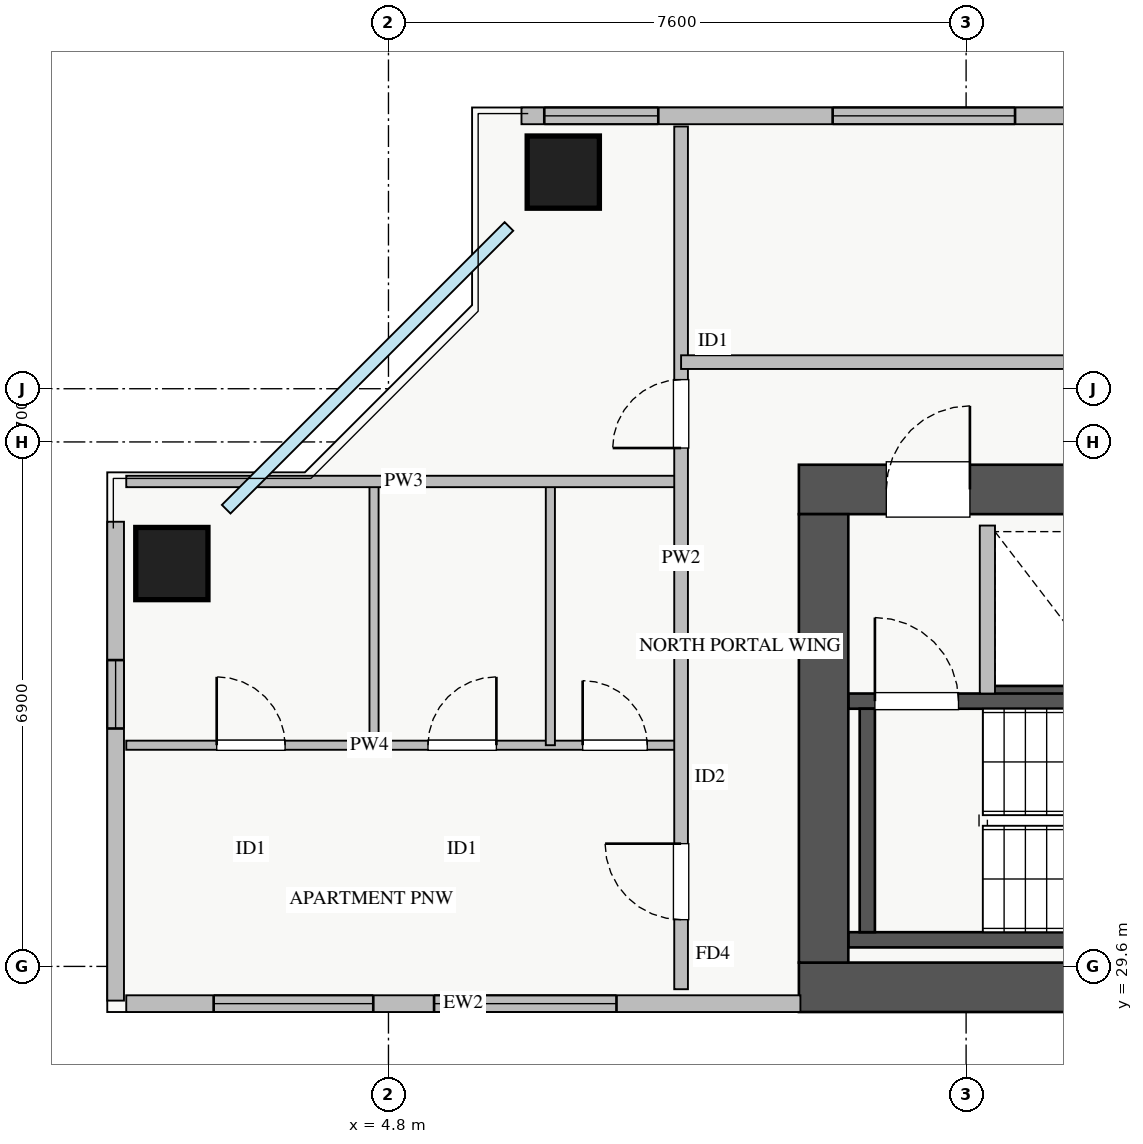
"""IFC4 building model, lengths in metres.
Left out: names, types, materials, properties, quantities, classifications, styles, units other than length and angle.
Written with IfcOpenShell. Run it as: python <this file> out.ifc"""

import sys

from ifc_helpers import new_model, si_unit, direction, frame, frame_2d, origin, origin_2d, place, context, subcontext, project, spatial, rectangle, extrude, source, transform, mapped, element, fill, save


model = new_model("IFC4")
c1 = context("Model", 3, precision=1e-05, world=origin(), true_north=direction((0.0, 1.0)))
c2 = subcontext(c1, "Body", "Model", "MODEL_VIEW")
j1 = project(units=[si_unit("LENGTHUNIT", "METRE"), si_unit("PLANEANGLEUNIT", "RADIAN")], contexts=[c1])
p1 = place(None, origin())
s1 = spatial("IfcSite", under=j1, at=p1, CompositionType="ELEMENT")
p2 = place(p1, origin())
s2 = spatial("IfcBuilding", under=s1, at=p2, CompositionType="ELEMENT")
p3 = place(p2, frame((0.0, 0.0, 156.75)))
s3 = spatial("IfcBuildingStorey", under=s2, at=p3, CompositionType="ELEMENT", Elevation=156.75)
p4 = place(p3, frame((12.68, 33.2, 0.0), z_axis=(0.0, 0.0, 1.0), x_axis=(1.0, 0.0, 0.0)))
e1 = element("IfcWall", 1, at=p4, inside=s3, PredefinedType="SHEAR", context=c2, shape_type="SweptSolid", body=[
    extrude(rectangle(XDim=1.94, YDim=0.18, at=frame_2d((0.97, 0.0))), origin(), (0.0, 0.0, 1.0), 3.07),
])
p5 = place(p3, frame((10.85, 29.95, 0.0), z_axis=(0.0, 0.0, 1.0), x_axis=(1.0, 0.0, 0.0)))
e2 = element("IfcWall", 2, at=p5, inside=s3, PredefinedType="SHEAR", context=c2, shape_type="SweptSolid", body=[
    extrude(rectangle(XDim=7.3, YDim=0.2, at=frame_2d((3.65, 0.0))), origin(), (0.0, 0.0, 1.0), 3.25),
])
p6 = place(p3, frame((10.85, 33.09, 0.0), z_axis=(0.0, 0.0, 1.0), x_axis=(1.0, 0.0, 0.0)))
e3 = element("IfcWall", 3, at=p6, inside=s3, PredefinedType="SHEAR", context=c2, shape_type="SweptSolid", body=[
    extrude(rectangle(XDim=7.3, YDim=0.2, at=frame_2d((3.65, 0.0))), origin(), (0.0, 0.0, 1.0), 3.25),
])
p7 = place(p6, frame((0.35, 0.0, 0.0)))
e4 = element("IfcOpeningElement", 4, at=p7, cuts=e3, PredefinedType="OPENING", context=c2, shape_type="SweptSolid", body=[
    extrude(rectangle(XDim=1.1, YDim=2.05, at=frame_2d((0.55, 1.025))), frame((0.0, 0.11, 0.0), z_axis=(0.0, -1.0, 0.0), x_axis=(1.0, 0.0, 0.0)), (0.0, 0.0, 1.0), 0.22),
])
p8 = place(p3, frame((11.1, 30.05, 0.0), z_axis=(0.0, 0.0, 1.0), x_axis=(0.0, 1.0, 0.0)))
e5 = element("IfcWall", 5, at=p8, inside=s3, PredefinedType="SHEAR", context=c2, shape_type="SweptSolid", body=[
    extrude(rectangle(XDim=2.94, YDim=0.2, at=frame_2d((1.47, 0.0))), origin(), (0.0, 0.0, 1.0), 3.25),
])
p9 = place(p3, frame((10.2, 29.325, 0.0), z_axis=(0.0, 0.0, 1.0), x_axis=(1.0, 0.0, 0.0)))
e6 = element("IfcWall", 6, at=p9, inside=s3, PredefinedType="SHEAR", context=c2, shape_type="SweptSolid", body=[
    extrude(rectangle(XDim=17.6, YDim=0.65, at=frame_2d((8.8, 0.0))), origin(), (0.0, 0.0, 1.0), 3.25),
])
p10 = place(p3, frame((10.2, 35.875, 0.0), z_axis=(0.0, 0.0, 1.0), x_axis=(1.0, 0.0, 0.0)))
e7 = element("IfcWall", 7, at=p10, inside=s3, PredefinedType="SHEAR", context=c2, shape_type="SweptSolid", body=[
    extrude(rectangle(XDim=17.6, YDim=0.65, at=frame_2d((8.8, 0.0))), origin(), (0.0, 0.0, 1.0), 3.25),
])
p11 = place(p10, frame((1.15, 0.0, 0.0)))
e8 = element("IfcOpeningElement", 8, at=p11, cuts=e7, PredefinedType="OPENING", context=c2, shape_type="SweptSolid", body=[
    extrude(rectangle(XDim=1.1, YDim=2.05, at=frame_2d((0.55, 1.025))), frame((0.0, 0.335, 0.0), z_axis=(0.0, -1.0, 0.0), x_axis=(1.0, 0.0, 0.0)), (0.0, 0.0, 1.0), 0.67),
])
p12 = place(p10, frame((8.3, 0.0, 0.0)))
e9 = element("IfcOpeningElement", 9, at=p12, cuts=e7, PredefinedType="OPENING", context=c2, shape_type="SweptSolid", body=[
    extrude(rectangle(XDim=1.1, YDim=2.05, at=frame_2d((0.55, 1.025))), frame((0.0, 0.335, 0.0), z_axis=(0.0, -1.0, 0.0), x_axis=(1.0, 0.0, 0.0)), (0.0, 0.0, 1.0), 0.67),
])
p13 = place(p10, frame((4.9, 0.0, 0.0)))
e10 = element("IfcOpeningElement", 10, at=p13, cuts=e7, PredefinedType="OPENING", context=c2, shape_type="SweptSolid", body=[
    extrude(rectangle(XDim=1.1, YDim=2.05, at=frame_2d((0.55, 1.025))), frame((0.0, 0.335, 0.0), z_axis=(0.0, -1.0, 0.0), x_axis=(1.0, 0.0, 0.0)), (0.0, 0.0, 1.0), 0.67),
])
p14 = place(p10, frame((14.74, 0.0, 0.0)))
e11 = element("IfcOpeningElement", 11, at=p14, cuts=e7, PredefinedType="OPENING", context=c2, shape_type="SweptSolid", body=[
    extrude(rectangle(XDim=1.0, YDim=2.05, at=frame_2d((0.5, 1.025))), frame((0.0, 0.335, 0.0), z_axis=(0.0, -1.0, 0.0), x_axis=(1.0, 0.0, 0.0)), (0.0, 0.0, 1.0), 0.67),
])
p15 = place(p10, frame((10.175, 0.0, 0.0)))
e12 = element("IfcOpeningElement", 12, at=p15, cuts=e7, PredefinedType="OPENING", context=c2, shape_type="SweptSolid", body=[
    extrude(rectangle(XDim=1.0, YDim=2.05, at=frame_2d((0.5, 1.025))), frame((0.0, 0.335, 0.0), z_axis=(0.0, -1.0, 0.0), x_axis=(1.0, 0.0, 0.0)), (0.0, 0.0, 1.0), 0.67),
])
p16 = place(p10, frame((12.625, 0.0, 0.0)))
e13 = element("IfcOpeningElement", 13, at=p16, cuts=e7, PredefinedType="OPENING", context=c2, shape_type="SweptSolid", body=[
    extrude(rectangle(XDim=1.0, YDim=2.05, at=frame_2d((0.5, 1.025))), frame((0.0, 0.335, 0.0), z_axis=(0.0, -1.0, 0.0), x_axis=(1.0, 0.0, 0.0)), (0.0, 0.0, 1.0), 0.67),
])
p17 = place(p3, frame((10.525, 29.65, 0.0), z_axis=(0.0, 0.0, 1.0), x_axis=(0.0, 1.0, 0.0)))
e14 = element("IfcWall", 14, at=p17, inside=s3, PredefinedType="SHEAR", context=c2, shape_type="SweptSolid", body=[
    extrude(rectangle(XDim=5.9, YDim=0.65, at=frame_2d((2.95, 0.0))), origin(), (0.0, 0.0, 1.0), 3.25),
])
m1 = source(origin(), c2, "Body", "SweptSolid", [
    extrude(rectangle(XDim=0.95, YDim=0.95, at=origin_2d()), origin(), (0.0, 0.0, 1.0), 3.25),
])
for number, where, z_axis, x_axis in (
    (15, (7.1, 40.05, 0.0), (0.0, 0.0, 1.0), (1.0, 0.0, 0.0)),
    (16, (1.95, 34.9, 0.0), (0.0, 0.0, 1.0), (1.0, 0.0, 0.0)),
):
    element("IfcColumn", number, at=place(p3, frame(where, z_axis=z_axis, x_axis=x_axis)), inside=s3, PredefinedType="COLUMN", context=c2, shape_type="MappedRepresentation", body=[
        mapped(m1, transform((0.0, 0.0, 0.0), x_axis=(1.0, 0.0, 0.0), y_axis=(0.0, 1.0, 0.0), z_axis=(0.0, 0.0, 1.0), scale=1.0)),
    ])
p18 = place(p3, frame((1.35, 29.11, 0.0), z_axis=(0.0, 0.0, 1.0), x_axis=(1.0, 0.0, 0.0)))
e17 = element("IfcWall", 17, at=p18, inside=s3, PredefinedType="STANDARD", context=c2, shape_type="SweptSolid", body=[
    extrude(rectangle(XDim=8.87, YDim=0.22, at=frame_2d((4.435, 0.0))), origin(), (0.0, 0.0, 1.0), 2.61),
])
p19 = place(p18, frame((1.15, 0.0, 0.9)))
e18 = element("IfcOpeningElement", 18, at=p19, cuts=e17, PredefinedType="OPENING", context=c2, shape_type="SweptSolid", body=[
    extrude(rectangle(XDim=2.1, YDim=1.48, at=frame_2d((1.05, 0.74))), frame((0.0, 0.12, 0.0), z_axis=(0.0, -1.0, 0.0), x_axis=(1.0, 0.0, 0.0)), (0.0, 0.0, 1.0), 0.24),
])
p20 = place(p18, frame((4.05, 0.0, 0.9)))
e19 = element("IfcOpeningElement", 19, at=p20, cuts=e17, PredefinedType="OPENING", context=c2, shape_type="SweptSolid", body=[
    extrude(rectangle(XDim=2.4, YDim=1.5, at=frame_2d((1.2, 0.75))), frame((0.0, 0.12, 0.0), z_axis=(0.0, -1.0, 0.0), x_axis=(1.0, 0.0, 0.0)), (0.0, 0.0, 1.0), 0.24),
])
p21 = place(p3, frame((1.21, 29.15, 0.0), z_axis=(0.0, 0.0, 1.0), x_axis=(0.0, 1.0, 0.0)))
e20 = element("IfcWall", 20, at=p21, inside=s3, PredefinedType="STANDARD", context=c2, shape_type="SweptSolid", body=[
    extrude(rectangle(XDim=6.3, YDim=0.22, at=frame_2d((3.15, 0.0))), origin(), (0.0, 0.0, 1.0), 2.61),
])
p22 = place(p21, frame((3.58, 0.0, 0.9)))
e21 = element("IfcOpeningElement", 21, at=p22, cuts=e20, PredefinedType="OPENING", context=c2, shape_type="SweptSolid", body=[
    extrude(rectangle(XDim=0.9, YDim=1.2, at=frame_2d((0.45, 0.6))), frame((0.0, 0.12, 0.0), z_axis=(0.0, -1.0, 0.0), x_axis=(1.0, 0.0, 0.0)), (0.0, 0.0, 1.0), 0.24),
])
p23 = place(p3, frame((6.55, 40.79, 0.0), z_axis=(0.0, 0.0, 1.0), x_axis=(1.0, 0.0, 0.0)))
e22 = element("IfcWall", 22, at=p23, inside=s3, PredefinedType="STANDARD", context=c2, shape_type="SweptSolid", body=[
    extrude(rectangle(XDim=24.9, YDim=0.22, at=frame_2d((12.45, 0.0))), origin(), (0.0, 0.0, 1.0), 2.61),
])
p24 = place(p23, frame((0.3, 0.0, 0.9)))
e23 = element("IfcOpeningElement", 23, at=p24, cuts=e22, PredefinedType="OPENING", context=c2, shape_type="SweptSolid", body=[
    extrude(rectangle(XDim=1.5, YDim=1.5, at=frame_2d((0.75, 0.75))), frame((0.0, 0.12, 0.0), z_axis=(0.0, -1.0, 0.0), x_axis=(1.0, 0.0, 0.0)), (0.0, 0.0, 1.0), 0.24),
])
p25 = place(p23, frame((8.438, 0.0, 0.9)))
e24 = element("IfcOpeningElement", 24, at=p25, cuts=e22, PredefinedType="OPENING", context=c2, shape_type="SweptSolid", body=[
    extrude(rectangle(XDim=1.8, YDim=1.45, at=frame_2d((0.9, 0.725))), frame((0.0, 0.12, 0.0), z_axis=(0.0, -1.0, 0.0), x_axis=(1.0, 0.0, 0.0)), (0.0, 0.0, 1.0), 0.24),
])
p26 = place(p23, frame((14.813, 0.0, 0.9)))
e25 = element("IfcOpeningElement", 25, at=p26, cuts=e22, PredefinedType="OPENING", context=c2, shape_type="SweptSolid", body=[
    extrude(rectangle(XDim=1.5, YDim=1.45, at=frame_2d((0.75, 0.725))), frame((0.0, 0.12, 0.0), z_axis=(0.0, -1.0, 0.0), x_axis=(1.0, 0.0, 0.0)), (0.0, 0.0, 1.0), 0.24),
])
p27 = place(p23, frame((20.738, 0.0, 0.9)))
e26 = element("IfcOpeningElement", 26, at=p27, cuts=e22, PredefinedType="OPENING", context=c2, shape_type="SweptSolid", body=[
    extrude(rectangle(XDim=2.1, YDim=1.48, at=frame_2d((1.05, 0.74))), frame((0.0, 0.12, 0.0), z_axis=(0.0, -1.0, 0.0), x_axis=(1.0, 0.0, 0.0)), (0.0, 0.0, 1.0), 0.24),
])
p28 = place(p23, frame((4.094, 0.0, 0.9)))
e27 = element("IfcOpeningElement", 27, at=p28, cuts=e22, PredefinedType="OPENING", context=c2, shape_type="SweptSolid", body=[
    extrude(rectangle(XDim=2.4, YDim=1.5, at=frame_2d((1.2, 0.75))), frame((0.0, 0.12, 0.0), z_axis=(0.0, -1.0, 0.0), x_axis=(1.0, 0.0, 0.0)), (0.0, 0.0, 1.0), 0.24),
])
p29 = place(p3, frame((12.68, 33.19, 0.0), z_axis=(0.0, 0.0, 1.0), x_axis=(0.0, 1.0, 0.0)))
e28 = element("IfcWall", 28, at=p29, inside=s3, PredefinedType="PARTITIONING", context=c2, shape_type="SweptSolid", body=[
    extrude(rectangle(XDim=2.21, YDim=0.2, at=frame_2d((1.105, 0.0))), origin(), (0.0, 0.0, 1.0), 3.07),
])
p30 = place(p3, frame((1.35, 32.51, 0.0), z_axis=(0.0, 0.0, 1.0), x_axis=(1.0, 0.0, 0.0)))
e29 = element("IfcWall", 29, at=p30, inside=s3, PredefinedType="PLUMBINGWALL", context=c2, shape_type="SweptSolid", body=[
    extrude(rectangle(XDim=7.3, YDim=0.12, at=frame_2d((3.65, 0.0))), origin(), (0.0, 0.0, 1.0), 3.07),
])
p31 = place(p30, frame((1.19, 0.0, 0.0)))
e30 = element("IfcOpeningElement", 30, at=p31, cuts=e29, PredefinedType="OPENING", context=c2, shape_type="SweptSolid", body=[
    extrude(rectangle(XDim=0.9, YDim=2.05, at=frame_2d((0.45, 1.025))), frame((0.0, 0.07, 0.0), z_axis=(0.0, -1.0, 0.0), x_axis=(1.0, 0.0, 0.0)), (0.0, 0.0, 1.0), 0.14),
])
p32 = place(p30, frame((3.97, 0.0, 0.0)))
e31 = element("IfcOpeningElement", 31, at=p32, cuts=e29, PredefinedType="OPENING", context=c2, shape_type="SweptSolid", body=[
    extrude(rectangle(XDim=0.9, YDim=2.05, at=frame_2d((0.45, 1.025))), frame((0.0, 0.07, 0.0), z_axis=(0.0, -1.0, 0.0), x_axis=(1.0, 0.0, 0.0)), (0.0, 0.0, 1.0), 0.14),
])
p33 = place(p30, frame((6.005, 0.0, 0.0)))
e32 = element("IfcOpeningElement", 32, at=p33, cuts=e29, PredefinedType="OPENING", context=c2, shape_type="SweptSolid", body=[
    extrude(rectangle(XDim=0.85, YDim=2.05, at=frame_2d((0.425, 1.025))), frame((0.0, 0.07, 0.0), z_axis=(0.0, -1.0, 0.0), x_axis=(1.0, 0.0, 0.0)), (0.0, 0.0, 1.0), 0.14),
])
p34 = place(p3, frame((4.61, 32.51, 0.0), z_axis=(0.0, 0.0, 1.0), x_axis=(0.0, 1.0, 0.0)))
e33 = element("IfcWall", 33, at=p34, inside=s3, PredefinedType="PLUMBINGWALL", context=c2, shape_type="SweptSolid", body=[
    extrude(rectangle(XDim=3.47, YDim=0.12, at=frame_2d((1.735, 0.0))), origin(), (0.0, 0.0, 1.0), 3.07),
])
p35 = place(p3, frame((6.93, 32.51, 0.0), z_axis=(0.0, 0.0, 1.0), x_axis=(0.0, 1.0, 0.0)))
e34 = element("IfcWall", 34, at=p35, inside=s3, PredefinedType="PLUMBINGWALL", context=c2, shape_type="SweptSolid", body=[
    extrude(rectangle(XDim=3.47, YDim=0.12, at=frame_2d((1.735, 0.0))), origin(), (0.0, 0.0, 1.0), 2.577),
])
p36 = place(p3, frame((1.35, 35.98, 0.0), z_axis=(0.0, 0.0, 1.0), x_axis=(1.0, 0.0, 0.0)))
e35 = element("IfcWall", 35, at=p36, inside=s3, PredefinedType="PARTITIONING", context=c2, shape_type="SweptSolid", body=[
    extrude(rectangle(XDim=7.3, YDim=0.15, at=frame_2d((3.65, 0.0))), origin(), (0.0, 0.0, 1.0), 3.07),
])
p37 = place(p3, frame((8.65, 29.3, 0.0), z_axis=(0.0, 0.0, 1.0), x_axis=(0.0, 1.0, 0.0)))
e36 = element("IfcWall", 36, at=p37, inside=s3, PredefinedType="PARTITIONING", context=c2, shape_type="SweptSolid", body=[
    extrude(rectangle(XDim=11.35, YDim=0.18, at=frame_2d((5.675, 0.0))), origin(), (0.0, 0.0, 1.0), 3.07),
])
p38 = place(p37, frame((0.915, 0.0, 0.0)))
e37 = element("IfcOpeningElement", 37, at=p38, cuts=e36, PredefinedType="OPENING", context=c2, shape_type="SweptSolid", body=[
    extrude(rectangle(XDim=1.0, YDim=2.05, at=frame_2d((0.5, 1.025))), frame((0.0, 0.1, 0.0), z_axis=(0.0, -1.0, 0.0), x_axis=(1.0, 0.0, 0.0)), (0.0, 0.0, 1.0), 0.2),
])
p39 = place(p37, frame((7.12, 0.0, 0.0)))
e38 = element("IfcOpeningElement", 38, at=p39, cuts=e36, PredefinedType="OPENING", context=c2, shape_type="SweptSolid", body=[
    extrude(rectangle(XDim=0.9, YDim=2.05, at=frame_2d((0.45, 1.025))), frame((0.0, 0.1, 0.0), z_axis=(0.0, -1.0, 0.0), x_axis=(1.0, 0.0, 0.0)), (0.0, 0.0, 1.0), 0.2),
])
p40 = place(p3, frame((8.65, 37.55, 0.0), z_axis=(0.0, 0.0, 1.0), x_axis=(1.0, 0.0, 0.0)))
e39 = element("IfcWall", 39, at=p40, inside=s3, PredefinedType="PARTITIONING", context=c2, shape_type="SweptSolid", body=[
    extrude(rectangle(XDim=23.8, YDim=0.18, at=frame_2d((11.9, 0.0))), origin(), (0.0, 0.0, 1.0), 3.07),
])
p41 = place(p40, frame((5.425, 0.0, 0.0)))
e40 = element("IfcOpeningElement", 40, at=p41, cuts=e39, PredefinedType="OPENING", context=c2, shape_type="SweptSolid", body=[
    extrude(rectangle(XDim=1.0, YDim=2.05, at=frame_2d((0.5, 1.025))), frame((0.0, 0.1, 0.0), z_axis=(0.0, -1.0, 0.0), x_axis=(1.0, 0.0, 0.0)), (0.0, 0.0, 1.0), 0.2),
])
p42 = place(p40, frame((17.325, 0.0, 0.0)))
e41 = element("IfcOpeningElement", 41, at=p42, cuts=e39, PredefinedType="OPENING", context=c2, shape_type="SweptSolid", body=[
    extrude(rectangle(XDim=1.0, YDim=2.05, at=frame_2d((0.5, 1.025))), frame((0.0, 0.1, 0.0), z_axis=(0.0, -1.0, 0.0), x_axis=(1.0, 0.0, 0.0)), (0.0, 0.0, 1.0), 0.2),
])
m2 = source(origin(), c2, "Body", "SweptSolid", [
    extrude(rectangle(XDim=2.1, YDim=1.48, at=frame_2d((1.05, 0.74))), frame((0.0, 0.03, 0.0), z_axis=(0.0, -1.0, 0.0), x_axis=(1.0, 0.0, 0.0)), (0.0, 0.0, 1.0), 0.06),
])
p43 = place(p19, origin())
e42 = element("IfcWindow", 42, at=p43, inside=s3, PartitioningType="TRIPLE_PANEL_VERTICAL", PredefinedType="WINDOW", context=c2, shape_type="MappedRepresentation", body=[
    mapped(m2, transform((0.0, 0.0, 0.0), x_axis=(1.0, 0.0, 0.0), y_axis=(0.0, 1.0, 0.0), z_axis=(0.0, 0.0, 1.0), scale=1.0)),
])
fill(e18, e42)
m3 = source(origin(), c2, "Body", "SweptSolid", [
    extrude(rectangle(XDim=2.4, YDim=1.5, at=frame_2d((1.2, 0.75))), frame((0.0, 0.03, 0.0), z_axis=(0.0, -1.0, 0.0), x_axis=(1.0, 0.0, 0.0)), (0.0, 0.0, 1.0), 0.06),
])
p44 = place(p20, origin())
e43 = element("IfcWindow", 43, at=p44, inside=s3, PartitioningType="TRIPLE_PANEL_VERTICAL", PredefinedType="WINDOW", context=c2, shape_type="MappedRepresentation", body=[
    mapped(m3, transform((0.0, 0.0, 0.0), x_axis=(1.0, 0.0, 0.0), y_axis=(0.0, 1.0, 0.0), z_axis=(0.0, 0.0, 1.0), scale=1.0)),
])
fill(e19, e43)
m4 = source(origin(), c2, "Body", "SweptSolid", [
    extrude(rectangle(XDim=1.5, YDim=1.5, at=frame_2d((0.75, 0.75))), frame((0.0, 0.03, 0.0), z_axis=(0.0, -1.0, 0.0), x_axis=(1.0, 0.0, 0.0)), (0.0, 0.0, 1.0), 0.06),
])
p45 = place(p24, origin())
e44 = element("IfcWindow", 44, at=p45, inside=s3, PartitioningType="TRIPLE_PANEL_VERTICAL", PredefinedType="WINDOW", context=c2, shape_type="MappedRepresentation", body=[
    mapped(m4, transform((0.0, 0.0, 0.0), x_axis=(1.0, 0.0, 0.0), y_axis=(0.0, 1.0, 0.0), z_axis=(0.0, 0.0, 1.0), scale=1.0)),
])
fill(e23, e44)
m5 = source(origin(), c2, "Body", "SweptSolid", [
    extrude(rectangle(XDim=1.1, YDim=2.05, at=frame_2d((0.55, 1.025))), frame((0.0, 0.025, 0.0), z_axis=(0.0, -1.0, 0.0), x_axis=(1.0, 0.0, 0.0)), (0.0, 0.0, 1.0), 0.05),
])
p46 = place(p11, origin())
e45 = element("IfcDoor", 45, at=p46, inside=s3, OperationType="SINGLE_SWING_RIGHT", PredefinedType="DOOR", context=c2, shape_type="MappedRepresentation", body=[
    mapped(m5, transform((0.0, 0.0, 0.0), x_axis=(1.0, 0.0, 0.0), y_axis=(0.0, 1.0, 0.0), z_axis=(0.0, 0.0, 1.0), scale=1.0)),
])
fill(e8, e45)
p47 = place(p7, origin())
e46 = element("IfcDoor", 46, at=p47, inside=s3, OperationType="SINGLE_SWING_LEFT", PredefinedType="DOOR", context=c2, shape_type="MappedRepresentation", body=[
    mapped(m5, transform((0.0, 0.0, 0.0), x_axis=(1.0, 0.0, 0.0), y_axis=(0.0, 1.0, 0.0), z_axis=(0.0, 0.0, 1.0), scale=1.0)),
])
fill(e4, e46)
m6 = source(origin(), c2, "Body", "SweptSolid", [
    extrude(rectangle(XDim=0.9, YDim=2.05, at=frame_2d((0.45, 1.025))), frame((0.0, 0.025, 0.0), z_axis=(0.0, -1.0, 0.0), x_axis=(1.0, 0.0, 0.0)), (0.0, 0.0, 1.0), 0.05),
])
p48 = place(p31, origin())
e47 = element("IfcDoor", 47, at=p48, inside=s3, OperationType="SINGLE_SWING_LEFT", PredefinedType="DOOR", context=c2, shape_type="MappedRepresentation", body=[
    mapped(m6, transform((0.0, 0.0, 0.0), x_axis=(1.0, 0.0, 0.0), y_axis=(0.0, 1.0, 0.0), z_axis=(0.0, 0.0, 1.0), scale=1.0)),
])
fill(e30, e47)
p49 = place(p32, origin())
e48 = element("IfcDoor", 48, at=p49, inside=s3, OperationType="SINGLE_SWING_RIGHT", PredefinedType="DOOR", context=c2, shape_type="MappedRepresentation", body=[
    mapped(m6, transform((0.0, 0.0, 0.0), x_axis=(1.0, 0.0, 0.0), y_axis=(0.0, 1.0, 0.0), z_axis=(0.0, 0.0, 1.0), scale=1.0)),
])
fill(e31, e48)
m7 = source(origin(), c2, "Body", "SweptSolid", [
    extrude(rectangle(XDim=0.85, YDim=2.05, at=frame_2d((0.425, 1.025))), frame((0.0, 0.025, 0.0), z_axis=(0.0, -1.0, 0.0), x_axis=(1.0, 0.0, 0.0)), (0.0, 0.0, 1.0), 0.05),
])
p50 = place(p33, origin())
e49 = element("IfcDoor", 49, at=p50, inside=s3, OperationType="SINGLE_SWING_LEFT", PredefinedType="DOOR", context=c2, shape_type="MappedRepresentation", body=[
    mapped(m7, transform((0.0, 0.0, 0.0), x_axis=(1.0, 0.0, 0.0), y_axis=(0.0, 1.0, 0.0), z_axis=(0.0, 0.0, 1.0), scale=1.0)),
])
fill(e32, e49)
m8 = source(origin(), c2, "Body", "SweptSolid", [
    extrude(rectangle(XDim=1.0, YDim=2.05, at=frame_2d((0.5, 1.025))), frame((0.0, 0.025, 0.0), z_axis=(0.0, -1.0, 0.0), x_axis=(1.0, 0.0, 0.0)), (0.0, 0.0, 1.0), 0.05),
])
p51 = place(p38, origin())
e50 = element("IfcDoor", 50, at=p51, inside=s3, OperationType="SINGLE_SWING_RIGHT", PredefinedType="DOOR", context=c2, shape_type="MappedRepresentation", body=[
    mapped(m8, transform((0.0, 0.0, 0.0), x_axis=(1.0, 0.0, 0.0), y_axis=(0.0, 1.0, 0.0), z_axis=(0.0, 0.0, 1.0), scale=1.0)),
])
fill(e37, e50)
p52 = place(p39, origin())
e51 = element("IfcDoor", 51, at=p52, inside=s3, OperationType="SINGLE_SWING_LEFT", PredefinedType="DOOR", context=c2, shape_type="MappedRepresentation", body=[
    mapped(m6, transform((0.0, 0.0, 0.0), x_axis=(1.0, 0.0, 0.0), y_axis=(0.0, 1.0, 0.0), z_axis=(0.0, 0.0, 1.0), scale=1.0)),
])
fill(e38, e51)
p53 = place(p28, origin())
e52 = element("IfcWindow", 52, at=p53, inside=s3, PartitioningType="TRIPLE_PANEL_VERTICAL", PredefinedType="WINDOW", context=c2, shape_type="MappedRepresentation", body=[
    mapped(m3, transform((0.0, 0.0, 0.0), x_axis=(1.0, 0.0, 0.0), y_axis=(0.0, 1.0, 0.0), z_axis=(0.0, 0.0, 1.0), scale=1.0)),
])
fill(e27, e52)
m9 = source(origin(), c2, "Body", "SweptSolid", [
    extrude(rectangle(XDim=0.9, YDim=1.2, at=frame_2d((0.45, 0.6))), frame((0.0, 0.03, 0.0), z_axis=(0.0, -1.0, 0.0), x_axis=(1.0, 0.0, 0.0)), (0.0, 0.0, 1.0), 0.06),
])
p54 = place(p22, origin())
e53 = element("IfcWindow", 53, at=p54, inside=s3, PartitioningType="SINGLE_PANEL", PredefinedType="WINDOW", context=c2, shape_type="MappedRepresentation", body=[
    mapped(m9, transform((0.0, 0.0, 0.0), x_axis=(1.0, 0.0, 0.0), y_axis=(0.0, 1.0, 0.0), z_axis=(0.0, 0.0, 1.0), scale=1.0)),
])
fill(e21, e53)
save(model, sys.argv[1])
